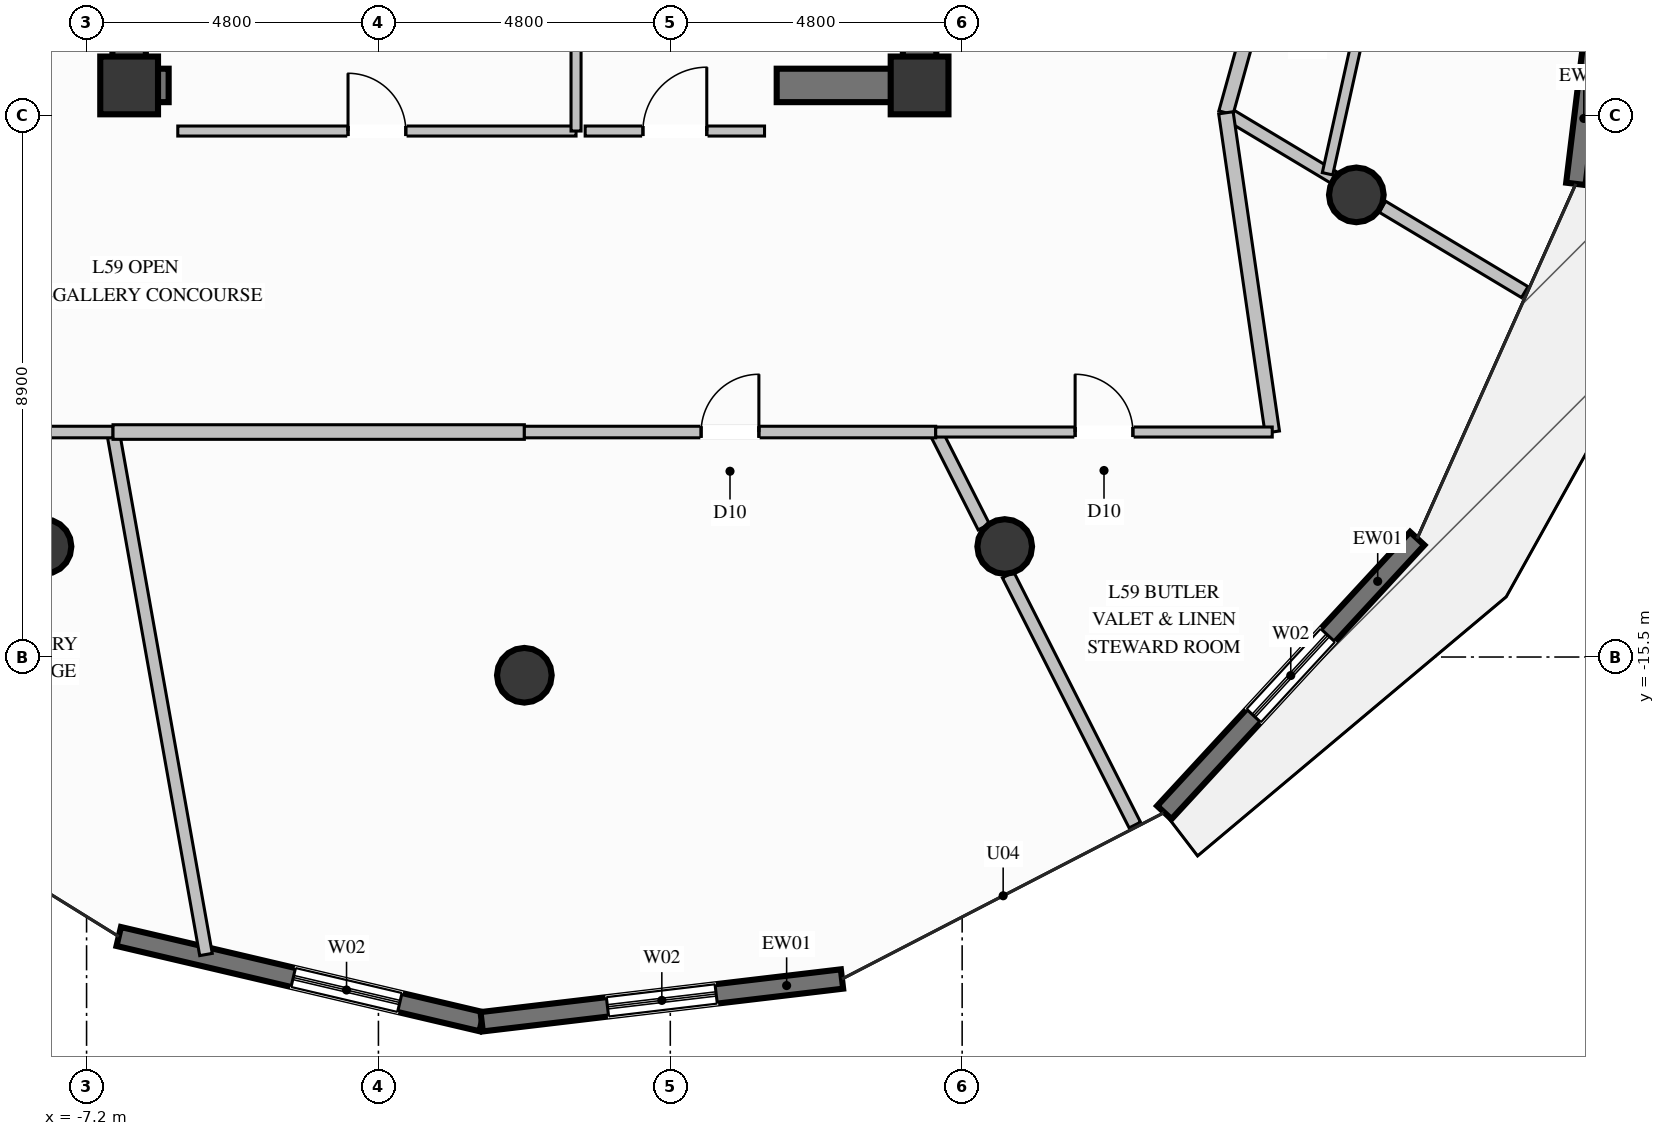
"""IFC4 building model, lengths in metres.
Left out: names, types, materials, properties, quantities, classifications, styles, units other than length and angle.
Written with IfcOpenShell. Run it as: python <this file> out.ifc"""

import sys

from ifc_helpers import new_model, si_unit, direction, frame, frame_2d, origin, origin_2d, place, context, subcontext, project, spatial, rectangle, circle, extrude, element, fill, save


model = new_model("IFC4")
c1 = context("Model", 3, precision=1e-05, world=origin(), true_north=direction((0.0, 1.0)))
c2 = subcontext(c1, "Body", "Model", "MODEL_VIEW")
j1 = project(units=[si_unit("LENGTHUNIT", "METRE"), si_unit("PLANEANGLEUNIT", "RADIAN")], contexts=[c1])
p1 = place(None, origin())
s1 = spatial("IfcSite", under=j1, at=p1, CompositionType="ELEMENT")
p2 = place(p1, origin())
s2 = spatial("IfcBuilding", under=s1, at=p2, CompositionType="ELEMENT")
p3 = place(p2, frame((0.0, 0.0, 227.2)))
s3 = spatial("IfcBuildingStorey", under=s2, at=p3, CompositionType="ELEMENT", Elevation=227.2)
for number, where, z_axis, x_axis in (
    (1, (-6.5, -6.1, 0.0), (0.0, 0.0, 1.0), (1.0, 0.0, 0.0)),
    (2, (6.5, -6.1, 0.0), (0.0, 0.0, 1.0), (1.0, 0.0, 0.0)),
):
    element("IfcColumn", number, at=place(p3, frame(where, z_axis=z_axis, x_axis=x_axis)), inside=s3, PredefinedType="COLUMN", context=c2, shape_type="SweptSolid", body=[
        extrude(rectangle(XDim=0.95, YDim=0.95, at=origin_2d()), origin(), (0.0, 0.0, 1.0), 3.6),
    ])
p4 = place(p3, frame((-6.225, -6.1, 0.0), z_axis=(0.0, 0.0, 1.0), x_axis=(1.0, 0.0, 0.0)))
e3 = element("IfcWall", 3, at=p4, inside=s3, PredefinedType="SHEAR", context=c2, shape_type="SweptSolid", body=[
    extrude(rectangle(XDim=0.375, YDim=0.55, at=frame_2d((0.188, 0.0))), origin(), (0.0, 0.0, 1.0), 3.6),
])
p5 = place(p3, frame((4.15, -6.1, 0.0), z_axis=(0.0, 0.0, 1.0), x_axis=(1.0, 0.0, 0.0)))
e4 = element("IfcWall", 4, at=p5, inside=s3, PredefinedType="SHEAR", context=c2, shape_type="SweptSolid", body=[
    extrude(rectangle(XDim=2.075, YDim=0.55, at=frame_2d((1.038, 0.0))), origin(), (0.0, 0.0, 1.0), 3.6),
])
p6 = place(p3, frame((-6.5, -6.375, 0.0), z_axis=(0.0, 0.0, 1.0), x_axis=(0.0, 1.0, 0.0)))
e5 = element("IfcWall", 5, at=p6, inside=s3, PredefinedType="SHEAR", context=c2, shape_type="SweptSolid", body=[
    extrude(rectangle(XDim=3.025, YDim=0.55, at=frame_2d((1.512, 0.0))), origin(), (0.0, 0.0, 1.0), 3.6),
])
p7 = place(p3, frame((6.5, -6.375, 0.0), z_axis=(0.0, 0.0, 1.0), x_axis=(0.0, 1.0, 0.0)))
e6 = element("IfcWall", 6, at=p7, inside=s3, PredefinedType="SHEAR", context=c2, shape_type="SweptSolid", body=[
    extrude(rectangle(XDim=4.025, YDim=0.55, at=frame_2d((2.012, 0.0))), origin(), (0.0, 0.0, 1.0), 3.6),
])
for number, where, z_axis, x_axis in (
    (7, (-7.9, -13.683, 0.0), (0.0, 0.0, 1.0), (1.0, 0.0, 0.0)),
    (8, (0.0, -15.8, 0.0), (0.0, 0.0, 1.0), (1.0, 0.0, 0.0)),
    (9, (7.9, -13.683, 0.0), (0.0, 0.0, 1.0), (1.0, 0.0, 0.0)),
    (10, (13.683, -7.9, 0.0), (0.0, 0.0, 1.0), (1.0, 0.0, 0.0)),
):
    element("IfcColumn", number, at=place(p3, frame(where, z_axis=z_axis, x_axis=x_axis)), inside=s3, PredefinedType="COLUMN", context=c2, shape_type="SweptSolid", body=[
        extrude(circle(Radius=0.45, at=origin_2d()), origin(), (0.0, 0.0, 1.0), 3.6),
    ])
p8 = place(p3, frame((14.684, -13.551, 0.0), z_axis=(0.0, 0.0, 1.0), x_axis=(-0.678273488218, -0.734809550279, 0.0)))
e11 = element("IfcWall", 11, at=p8, inside=s3, PredefinedType="SOLIDWALL", context=c2, shape_type="SweptSolid", body=[
    extrude(rectangle(XDim=6.132, YDim=0.32, at=frame_2d((3.066, 0.0))), origin(), (0.0, 0.0, 1.0), 3.36),
])
p9 = place(p8, frame((2.166, 0.0, 0.35)))
e12 = element("IfcOpeningElement", 12, at=p9, cuts=e11, PredefinedType="OPENING", context=c2, shape_type="SweptSolid", body=[
    extrude(rectangle(XDim=1.8, YDim=2.6, at=frame_2d((0.9, 1.3))), frame((0.0, 0.17, 0.0), z_axis=(0.0, -1.0, 0.0), x_axis=(1.0, 0.0, 0.0)), (0.0, 0.0, 1.0), 0.34),
])
p10 = place(p3, frame((18.096, -1.131, 0.0), z_axis=(0.0, 0.0, 1.0), x_axis=(-0.12099160472, -0.992653530486, 0.0)))
e13 = element("IfcWall", 13, at=p10, inside=s3, PredefinedType="SOLIDWALL", context=c2, shape_type="SweptSolid", body=[
    extrude(rectangle(XDim=6.637, YDim=0.32, at=frame_2d((3.318, 0.0))), origin(), (0.0, 0.0, 1.0), 3.36),
])
p11 = place(p10, frame((2.418, 0.0, 0.35)))
e14 = element("IfcOpeningElement", 14, at=p11, cuts=e13, PredefinedType="OPENING", context=c2, shape_type="SweptSolid", body=[
    extrude(rectangle(XDim=1.8, YDim=2.6, at=frame_2d((0.9, 1.3))), frame((0.0, 0.17, 0.0), z_axis=(0.0, -1.0, 0.0), x_axis=(1.0, 0.0, 0.0)), (0.0, 0.0, 1.0), 0.34),
])
p12 = place(p3, frame((-0.702, -21.498, 0.0), z_axis=(0.0, 0.0, 1.0), x_axis=(-0.973503262374, 0.22867312511, 0.0)))
e15 = element("IfcWall", 15, at=p12, inside=s3, PredefinedType="SOLIDWALL", context=c2, shape_type="SweptSolid", body=[
    extrude(rectangle(XDim=6.131, YDim=0.32, at=frame_2d((3.066, 0.0))), origin(), (0.0, 0.0, 1.0), 3.36),
])
p13 = place(p12, frame((1.383, 0.0, 0.35)))
e16 = element("IfcOpeningElement", 16, at=p13, cuts=e15, PredefinedType="OPENING", context=c2, shape_type="SweptSolid", body=[
    extrude(rectangle(XDim=1.8, YDim=2.6, at=frame_2d((0.9, 1.3))), frame((0.0, 0.17, 0.0), z_axis=(0.0, -1.0, 0.0), x_axis=(1.0, 0.0, 0.0)), (0.0, 0.0, 1.0), 0.34),
])
p14 = place(p3, frame((5.224, -20.795, 0.0), z_axis=(0.0, 0.0, 1.0), x_axis=(-0.993034505957, -0.117823893921, 0.0)))
e17 = element("IfcWall", 17, at=p14, inside=s3, PredefinedType="SOLIDWALL", context=c2, shape_type="SweptSolid", body=[
    extrude(rectangle(XDim=5.968, YDim=0.32, at=frame_2d((2.984, 0.0))), origin(), (0.0, 0.0, 1.0), 3.36),
])
p15 = place(p14, frame((2.084, 0.0, 0.35)))
e18 = element("IfcOpeningElement", 18, at=p15, cuts=e17, PredefinedType="OPENING", context=c2, shape_type="SweptSolid", body=[
    extrude(rectangle(XDim=1.8, YDim=2.6, at=frame_2d((0.9, 1.3))), frame((0.0, 0.17, 0.0), z_axis=(0.0, -1.0, 0.0), x_axis=(1.0, 0.0, 0.0)), (0.0, 0.0, 1.0), 0.34),
])
p16 = place(p3, frame((-5.7, -6.85, 0.0), z_axis=(0.0, 0.0, 1.0), x_axis=(1.0, 0.0, 0.0)))
e19 = element("IfcWall", 19, at=p16, inside=s3, PredefinedType="PARTITIONING", context=c2, shape_type="SweptSolid", body=[
    extrude(rectangle(XDim=6.55, YDim=0.165, at=frame_2d((3.275, 0.0))), origin(), (0.0, 0.0, 1.0), 2.445),
])
p17 = place(p16, frame((2.8, 0.0, 0.0)))
e20 = element("IfcOpeningElement", 20, at=p17, cuts=e19, PredefinedType="OPENING", context=c2, shape_type="SweptSolid", body=[
    extrude(rectangle(XDim=0.95, YDim=2.1, at=frame_2d((0.475, 1.05))), frame((0.0, 0.093, 0.0), z_axis=(0.0, -1.0, 0.0), x_axis=(1.0, 0.0, 0.0)), (0.0, 0.0, 1.0), 0.185),
])
p18 = place(p3, frame((0.85, -6.85, 0.0), z_axis=(0.0, 0.0, 1.0), x_axis=(0.0, 1.0, 0.0)))
e21 = element("IfcWall", 21, at=p18, inside=s3, PredefinedType="PARTITIONING", context=c2, shape_type="SweptSolid", body=[
    extrude(rectangle(XDim=3.35, YDim=0.165, at=frame_2d((1.675, 0.0))), origin(), (0.0, 0.0, 1.0), 3.36),
])
p19 = place(p3, frame((1.0, -6.85, 0.0), z_axis=(0.0, 0.0, 1.0), x_axis=(1.0, 0.0, 0.0)))
e22 = element("IfcWall", 22, at=p19, inside=s3, PredefinedType="PARTITIONING", context=c2, shape_type="SweptSolid", body=[
    extrude(rectangle(XDim=2.95, YDim=0.165, at=frame_2d((1.475, 0.0))), origin(), (0.0, 0.0, 1.0), 2.445),
])
p20 = place(p19, frame((0.95, 0.0, 0.0)))
e23 = element("IfcOpeningElement", 23, at=p20, cuts=e22, PredefinedType="OPENING", context=c2, shape_type="SweptSolid", body=[
    extrude(rectangle(XDim=1.05, YDim=2.15, at=frame_2d((0.525, 1.075))), frame((0.0, 0.093, 0.0), z_axis=(0.0, -1.0, 0.0), x_axis=(1.0, 0.0, 0.0)), (0.0, 0.0, 1.0), 0.185),
])
p21 = place(p3, frame((11.538, -6.55, 0.0), z_axis=(0.0, 0.0, 1.0), x_axis=(0.85753462299, -0.514426253582, 0.0)))
e24 = element("IfcWall", 24, at=p21, inside=s3, PredefinedType="PARTITIONING", context=c2, shape_type="SweptSolid", body=[
    extrude(rectangle(XDim=2.066, YDim=0.21, at=frame_2d((1.033, 0.0))), origin(), (0.0, 0.0, 1.0), 2.876),
])
p22 = place(p3, frame((14.111, -8.094, 0.0), z_axis=(0.0, 0.0, 1.0), x_axis=(0.857500813626, -0.514482608676, 0.0)))
e25 = element("IfcWall", 25, at=p22, inside=s3, PredefinedType="PARTITIONING", context=c2, shape_type="SweptSolid", body=[
    extrude(rectangle(XDim=2.731, YDim=0.21, at=frame_2d((1.365, 0.0))), origin(), (0.0, 0.0, 1.0), 3.36),
])
p23 = place(p3, frame((11.538, -6.55, 0.0), z_axis=(0.0, 0.0, 1.0), x_axis=(0.267361785392, 0.963596220266, 0.0)))
e26 = element("IfcWall", 26, at=p23, inside=s3, PredefinedType="PARTITIONING", context=c2, shape_type="SweptSolid", body=[
    extrude(rectangle(XDim=2.768, YDim=0.24, at=frame_2d((1.384, 0.0))), origin(), (0.0, 0.0, 1.0), 3.36),
])
p24 = place(p3, frame((13.209, -7.553, 0.0), z_axis=(0.0, 0.0, 1.0), x_axis=(0.216412225458, 0.976302078597, 0.0)))
e27 = element("IfcWall", 27, at=p24, inside=s3, PredefinedType="PLUMBINGWALL", context=c2, shape_type="SweptSolid", body=[
    extrude(rectangle(XDim=3.193, YDim=0.175, at=frame_2d((1.596, 0.0))), origin(), (0.0, 0.0, 1.0), 2.929),
])
p25 = place(p3, frame((-6.765, -11.8, 0.0), z_axis=(0.0, 0.0, 1.0), x_axis=(0.17518157927, -0.984536141685, 0.0)))
e28 = element("IfcWall", 28, at=p25, inside=s3, PredefinedType="PARTITIONING", context=c2, shape_type="SweptSolid", body=[
    extrude(rectangle(XDim=8.727, YDim=0.21, at=frame_2d((4.364, 0.0))), origin(), (0.0, 0.0, 1.0), 3.36),
])
p26 = place(p3, frame((-12.3, -11.8, 0.0), z_axis=(0.0, 0.0, 1.0), x_axis=(1.0, 0.0, 0.0)))
e29 = element("IfcWall", 29, at=p26, inside=s3, PredefinedType="PARTITIONING", context=c2, shape_type="SweptSolid", body=[
    extrude(rectangle(XDim=5.535, YDim=0.19, at=frame_2d((2.768, 0.0))), origin(), (0.0, 0.0, 1.0), 3.36),
])
p27 = place(p26, frame((2.293, 0.0, 0.0)))
e30 = element("IfcOpeningElement", 30, at=p27, cuts=e29, PredefinedType="OPENING", context=c2, shape_type="SweptSolid", body=[
    extrude(rectangle(XDim=0.95, YDim=2.1, at=frame_2d((0.475, 1.05))), frame((0.0, 0.105, 0.0), z_axis=(0.0, -1.0, 0.0), x_axis=(1.0, 0.0, 0.0)), (0.0, 0.0, 1.0), 0.21),
])
p28 = place(p3, frame((6.765, -11.8, 0.0), z_axis=(0.0, 0.0, 1.0), x_axis=(0.452225083285, -0.891903847983, 0.0)))
e31 = element("IfcWall", 31, at=p28, inside=s3, PredefinedType="PARTITIONING", context=c2, shape_type="SweptSolid", body=[
    extrude(rectangle(XDim=1.751, YDim=0.21, at=frame_2d((0.875, 0.0))), origin(), (0.0, 0.0, 1.0), 2.876),
])
p29 = place(p3, frame((7.956, -14.15, 0.0), z_axis=(0.0, 0.0, 1.0), x_axis=(0.451972657996, -0.892031791151, 0.0)))
e32 = element("IfcWall", 32, at=p29, inside=s3, PredefinedType="PARTITIONING", context=c2, shape_type="SweptSolid", body=[
    extrude(rectangle(XDim=4.611, YDim=0.21, at=frame_2d((2.305, 0.0))), origin(), (0.0, 0.0, 1.0), 3.36),
])
p30 = place(p3, frame((-6.765, -11.8, 0.0), z_axis=(0.0, 0.0, 1.0), x_axis=(1.0, 0.0, 0.0)))
e33 = element("IfcWall", 33, at=p30, inside=s3, PredefinedType="PARTITIONING", context=c2, shape_type="SweptSolid", body=[
    extrude(rectangle(XDim=6.765, YDim=0.24, at=frame_2d((3.382, 0.0))), origin(), (0.0, 0.0, 1.0), 3.36),
])
p31 = place(p3, frame((0.0, -11.8, 0.0), z_axis=(0.0, 0.0, 1.0), x_axis=(1.0, 0.0, 0.0)))
e34 = element("IfcWall", 34, at=p31, inside=s3, PredefinedType="PARTITIONING", context=c2, shape_type="SweptSolid", body=[
    extrude(rectangle(XDim=6.765, YDim=0.19, at=frame_2d((3.382, 0.0))), origin(), (0.0, 0.0, 1.0), 3.36),
])
p32 = place(p31, frame((2.907, 0.0, 0.0)))
e35 = element("IfcOpeningElement", 35, at=p32, cuts=e34, PredefinedType="OPENING", context=c2, shape_type="SweptSolid", body=[
    extrude(rectangle(XDim=0.95, YDim=2.1, at=frame_2d((0.475, 1.05))), frame((0.0, 0.105, 0.0), z_axis=(0.0, -1.0, 0.0), x_axis=(1.0, 0.0, 0.0)), (0.0, 0.0, 1.0), 0.21),
])
p33 = place(p3, frame((12.3, -11.8, 0.0), z_axis=(0.0, 0.0, 1.0), x_axis=(-0.143630922764, 0.989631324295, 0.0)))
e36 = element("IfcWall", 36, at=p33, inside=s3, PredefinedType="PARTITIONING", context=c2, shape_type="SweptSolid", body=[
    extrude(rectangle(XDim=5.305, YDim=0.24, at=frame_2d((2.652, 0.0))), origin(), (0.0, 0.0, 1.0), 3.36),
])
p34 = place(p3, frame((6.765, -11.8, 0.0), z_axis=(0.0, 0.0, 1.0), x_axis=(1.0, 0.0, 0.0)))
e37 = element("IfcWall", 37, at=p34, inside=s3, PredefinedType="PARTITIONING", context=c2, shape_type="SweptSolid", body=[
    extrude(rectangle(XDim=5.535, YDim=0.165, at=frame_2d((2.768, 0.0))), origin(), (0.0, 0.0, 1.0), 3.36),
])
p35 = place(p34, frame((2.293, 0.0, 0.0)))
e38 = element("IfcOpeningElement", 38, at=p35, cuts=e37, PredefinedType="OPENING", context=c2, shape_type="SweptSolid", body=[
    extrude(rectangle(XDim=0.95, YDim=2.1, at=frame_2d((0.475, 1.05))), frame((0.0, 0.093, 0.0), z_axis=(0.0, -1.0, 0.0), x_axis=(1.0, 0.0, 0.0)), (0.0, 0.0, 1.0), 0.185),
])
p36 = place(p9, origin())
e39 = element("IfcWindow", 39, at=p36, inside=s3, PartitioningType="SINGLE_PANEL", PredefinedType="WINDOW", context=c2, shape_type="SweptSolid", body=[
    extrude(rectangle(XDim=1.8, YDim=2.6, at=frame_2d((0.9, 1.3))), frame((0.0, 0.03, 0.0), z_axis=(0.0, -1.0, 0.0), x_axis=(1.0, 0.0, 0.0)), (0.0, 0.0, 1.0), 0.06),
])
fill(e12, e39)
p37 = place(p13, origin())
e40 = element("IfcWindow", 40, at=p37, inside=s3, PartitioningType="SINGLE_PANEL", PredefinedType="WINDOW", context=c2, shape_type="SweptSolid", body=[
    extrude(rectangle(XDim=1.8, YDim=2.6, at=frame_2d((0.9, 1.3))), frame((0.0, 0.03, 0.0), z_axis=(0.0, -1.0, 0.0), x_axis=(1.0, 0.0, 0.0)), (0.0, 0.0, 1.0), 0.06),
])
fill(e16, e40)
p38 = place(p15, origin())
e41 = element("IfcWindow", 41, at=p38, inside=s3, PartitioningType="SINGLE_PANEL", PredefinedType="WINDOW", context=c2, shape_type="SweptSolid", body=[
    extrude(rectangle(XDim=1.8, YDim=2.6, at=frame_2d((0.9, 1.3))), frame((0.0, 0.03, 0.0), z_axis=(0.0, -1.0, 0.0), x_axis=(1.0, 0.0, 0.0)), (0.0, 0.0, 1.0), 0.06),
])
fill(e18, e41)
p39 = place(p17, origin())
e42 = element("IfcDoor", 42, at=p39, inside=s3, OperationType="SINGLE_SWING_LEFT", PredefinedType="DOOR", context=c2, shape_type="SweptSolid", body=[
    extrude(rectangle(XDim=0.95, YDim=2.1, at=frame_2d((0.475, 1.05))), frame((0.0, 0.025, 0.0), z_axis=(0.0, -1.0, 0.0), x_axis=(1.0, 0.0, 0.0)), (0.0, 0.0, 1.0), 0.05),
])
fill(e20, e42)
p40 = place(p20, origin())
e43 = element("IfcDoor", 43, at=p40, inside=s3, OperationType="SINGLE_SWING_RIGHT", PredefinedType="DOOR", context=c2, shape_type="SweptSolid", body=[
    extrude(rectangle(XDim=1.05, YDim=2.15, at=frame_2d((0.525, 1.075))), frame((0.0, 0.025, 0.0), z_axis=(0.0, -1.0, 0.0), x_axis=(1.0, 0.0, 0.0)), (0.0, 0.0, 1.0), 0.05),
])
fill(e23, e43)
p41 = place(p32, origin())
e44 = element("IfcDoor", 44, at=p41, inside=s3, OperationType="SINGLE_SWING_RIGHT", PredefinedType="DOOR", context=c2, shape_type="SweptSolid", body=[
    extrude(rectangle(XDim=0.95, YDim=2.1, at=frame_2d((0.475, 1.05))), frame((0.0, 0.025, 0.0), z_axis=(0.0, -1.0, 0.0), x_axis=(1.0, 0.0, 0.0)), (0.0, 0.0, 1.0), 0.05),
])
fill(e35, e44)
p42 = place(p35, origin())
e45 = element("IfcDoor", 45, at=p42, inside=s3, OperationType="SINGLE_SWING_LEFT", PredefinedType="DOOR", context=c2, shape_type="SweptSolid", body=[
    extrude(rectangle(XDim=0.95, YDim=2.1, at=frame_2d((0.475, 1.05))), frame((0.0, 0.025, 0.0), z_axis=(0.0, -1.0, 0.0), x_axis=(1.0, 0.0, 0.0)), (0.0, 0.0, 1.0), 0.05),
])
fill(e38, e45)
save(model, sys.argv[1])
